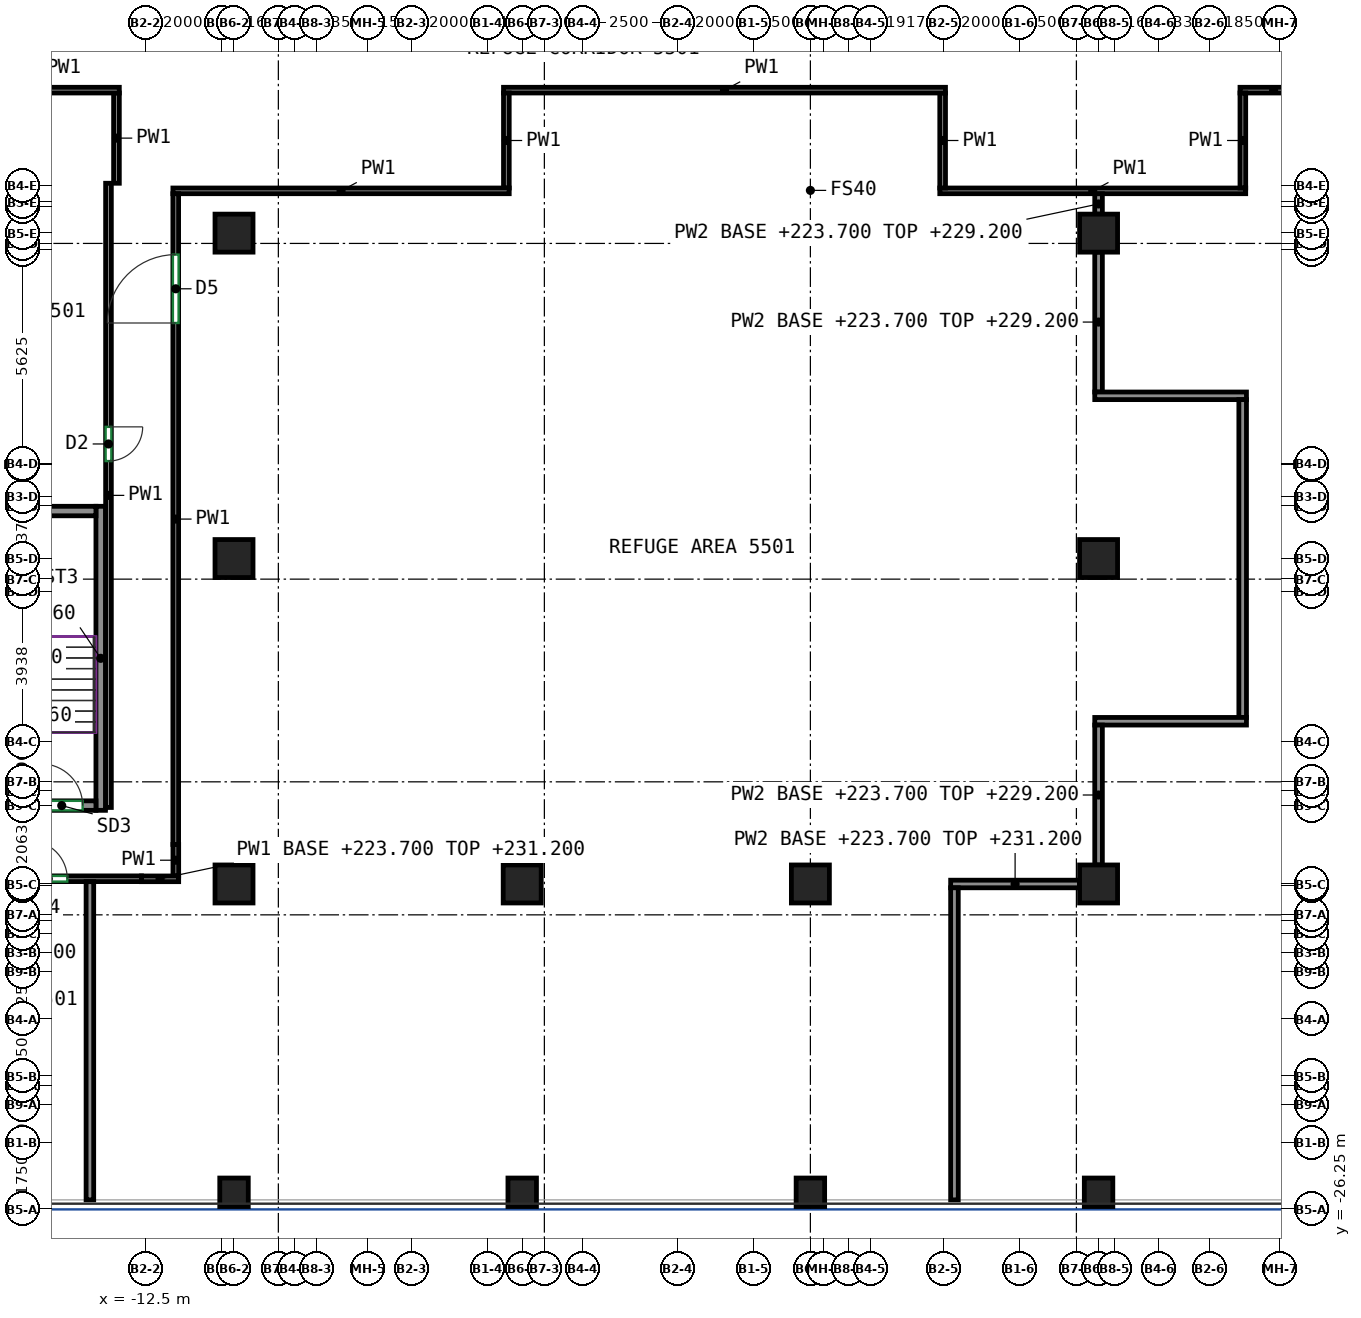
"""IFC4 building model, lengths in metres.
Left out: names, types, materials, properties, quantities, classifications, styles, units other than length and angle.
Written with IfcOpenShell. Run it as: python <this file> out.ifc"""

import sys

from ifc_helpers import new_model, si_unit, direction, frame, frame_2d, origin, origin_2d, place, context, subcontext, project, spatial, rectangle, extrude, source, transform, mapped, element, fill, save


model = new_model("IFC4")
c1 = context("Model", 3, precision=1e-05, world=origin(), true_north=direction((0.0, 1.0)))
c2 = subcontext(c1, "Body", "Model", "MODEL_VIEW")
j1 = project(units=[si_unit("LENGTHUNIT", "METRE"), si_unit("PLANEANGLEUNIT", "RADIAN")], contexts=[c1])
p1 = place(None, origin())
s1 = spatial("IfcSite", under=j1, at=p1, CompositionType="ELEMENT")
p2 = place(p1, origin())
s2 = spatial("IfcBuilding", under=s1, at=p2, CompositionType="ELEMENT")
p3 = place(p2, frame((0.0, 0.0, 223.7)))
s3 = spatial("IfcBuildingStorey", under=s2, at=p3, CompositionType="ELEMENT", Elevation=223.7)
m1 = source(origin(), c2, "Body", "SweptSolid", [
    extrude(rectangle(XDim=0.75, YDim=0.75, at=origin_2d()), origin(), (0.0, 0.0, 1.0), 5.5),
])
p4 = place(p3, frame((-10.167, -25.8, 0.0), z_axis=(0.0, 0.0, 1.0), x_axis=(1.0, 0.0, 0.0)))
e1 = element("IfcColumn", 1, at=p4, inside=s3, PredefinedType="COLUMN", context=c2, shape_type="MappedRepresentation", body=[
    mapped(m1, transform((0.0, 0.0, 0.0))),
])
m2 = source(origin(), c2, "Body", "SweptSolid", [
    extrude(rectangle(XDim=1.0, YDim=1.0, at=origin_2d()), origin(), (0.0, 0.0, 1.0), 5.5),
])
for number, where, z_axis, x_axis in (
    (2, (-10.167, -17.688, 0.0), (0.0, 0.0, 1.0), (1.0, 0.0, 0.0)),
    (3, (-10.167, -9.125, 0.0), (0.0, 0.0, 1.0), (1.0, 0.0, 0.0)),
    (4, (-10.167, -0.562, 0.0), (0.0, 0.0, 1.0), (1.0, 0.0, 0.0)),
):
    element("IfcColumn", number, at=place(p3, frame(where, z_axis=z_axis, x_axis=x_axis)), inside=s3, PredefinedType="COLUMN", context=c2, shape_type="MappedRepresentation", body=[
        mapped(m2, transform((0.0, 0.0, 0.0))),
    ])
p5 = place(p3, frame((-2.583, -25.8, 0.0), z_axis=(0.0, 0.0, 1.0), x_axis=(1.0, 0.0, 0.0)))
e5 = element("IfcColumn", 5, at=p5, inside=s3, PredefinedType="COLUMN", context=c2, shape_type="MappedRepresentation", body=[
    mapped(m1, transform((0.0, 0.0, 0.0))),
])
p6 = place(p3, frame((-2.583, -17.688, 0.0), z_axis=(0.0, 0.0, 1.0), x_axis=(1.0, 0.0, 0.0)))
e6 = element("IfcColumn", 6, at=p6, inside=s3, PredefinedType="COLUMN", context=c2, shape_type="MappedRepresentation", body=[
    mapped(m2, transform((0.0, 0.0, 0.0))),
])
p7 = place(p3, frame((5.0, -25.8, 0.0), z_axis=(0.0, 0.0, 1.0), x_axis=(1.0, 0.0, 0.0)))
e7 = element("IfcColumn", 7, at=p7, inside=s3, PredefinedType="COLUMN", context=c2, shape_type="MappedRepresentation", body=[
    mapped(m1, transform((0.0, 0.0, 0.0))),
])
p8 = place(p3, frame((5.0, -17.688, 0.0), z_axis=(0.0, 0.0, 1.0), x_axis=(1.0, 0.0, 0.0)))
e8 = element("IfcColumn", 8, at=p8, inside=s3, PredefinedType="COLUMN", context=c2, shape_type="MappedRepresentation", body=[
    mapped(m2, transform((0.0, 0.0, 0.0))),
])
p9 = place(p3, frame((12.583, -25.8, 0.0), z_axis=(0.0, 0.0, 1.0), x_axis=(1.0, 0.0, 0.0)))
e9 = element("IfcColumn", 9, at=p9, inside=s3, PredefinedType="COLUMN", context=c2, shape_type="MappedRepresentation", body=[
    mapped(m1, transform((0.0, 0.0, 0.0))),
])
for number, where, z_axis, x_axis in (
    (10, (12.583, -17.688, 0.0), (0.0, 0.0, 1.0), (1.0, 0.0, 0.0)),
    (11, (12.583, -9.125, 0.0), (0.0, 0.0, 1.0), (1.0, 0.0, 0.0)),
    (12, (12.583, -0.562, 0.0), (0.0, 0.0, 1.0), (1.0, 0.0, 0.0)),
):
    element("IfcColumn", number, at=place(p3, frame(where, z_axis=z_axis, x_axis=x_axis)), inside=s3, PredefinedType="COLUMN", context=c2, shape_type="MappedRepresentation", body=[
        mapped(m2, transform((0.0, 0.0, 0.0))),
    ])
m3 = source(origin(), c2, "Body", "SweptSolid", [
    extrude(rectangle(XDim=8.0, YDim=0.25, at=frame_2d((4.0, 0.0))), origin(), (0.0, 0.0, 1.0), 9.5),
])
p10 = place(p3, frame((-13.675, -15.75, 0.0), z_axis=(0.0, 0.0, 1.0), x_axis=(0.0, 1.0, 0.0)))
e13 = element("IfcWall", 13, at=p10, inside=s3, PredefinedType="SHEAR", context=c2, shape_type="MappedRepresentation", body=[
    mapped(m3, transform((0.0, 0.0, 0.0))),
])
m4 = source(origin(), c2, "Body", "SweptSolid", [
    extrude(rectangle(XDim=3.7, YDim=0.25, at=frame_2d((1.85, 0.0))), origin(), (0.0, 0.0, 1.0), 9.5),
])
p11 = place(p3, frame((-17.5, -15.625, 0.0), z_axis=(0.0, 0.0, 1.0), x_axis=(1.0, 0.0, 0.0)))
e14 = element("IfcWall", 14, at=p11, inside=s3, PredefinedType="SHEAR", context=c2, shape_type="MappedRepresentation", body=[
    mapped(m4, transform((0.0, 0.0, 0.0))),
])
p12 = place(p11, frame((0.35, 0.0, 0.0)))
e15 = element("IfcOpeningElement", 15, at=p12, cuts=e14, PredefinedType="OPENING", context=c2, shape_type="SweptSolid", body=[
    extrude(rectangle(XDim=1.1, YDim=2.1, at=frame_2d((0.55, 1.05))), frame((0.0, 0.135, 0.0), z_axis=(0.0, -1.0, 0.0), x_axis=(1.0, 0.0, 0.0)), (0.0, 0.0, 1.0), 0.27),
])
p13 = place(p11, frame((2.25, 0.0, 0.0)))
e16 = element("IfcOpeningElement", 16, at=p13, cuts=e14, PredefinedType="OPENING", context=c2, shape_type="SweptSolid", body=[
    extrude(rectangle(XDim=1.1, YDim=2.1, at=frame_2d((0.55, 1.05))), frame((0.0, 0.135, 0.0), z_axis=(0.0, -1.0, 0.0), x_axis=(1.0, 0.0, 0.0)), (0.0, 0.0, 1.0), 0.27),
])
p14 = place(p3, frame((-17.5, -7.875, 0.0), z_axis=(0.0, 0.0, 1.0), x_axis=(1.0, 0.0, 0.0)))
e17 = element("IfcWall", 17, at=p14, inside=s3, PredefinedType="SHEAR", context=c2, shape_type="MappedRepresentation", body=[
    mapped(m4, transform((0.0, 0.0, 0.0))),
])
p15 = place(p3, frame((-13.47, 0.75, 0.0), z_axis=(0.0, 0.0, 1.0), x_axis=(0.0, -1.0, 0.0)))
e18 = element("IfcWall", 18, at=p15, inside=s3, PredefinedType="PARTITIONING", context=c2, shape_type="SweptSolid", body=[
    extrude(rectangle(XDim=16.425, YDim=0.15, at=frame_2d((8.212, 0.0))), origin(), (0.0, 0.0, 1.0), 9.5),
])
p16 = place(p15, frame((6.41, 0.0, 0.0)))
e19 = element("IfcOpeningElement", 19, at=p16, cuts=e18, PredefinedType="OPENING", context=c2, shape_type="SweptSolid", body=[
    extrude(rectangle(XDim=0.9, YDim=2.1, at=frame_2d((0.45, 1.05))), frame((0.0, 0.085, 0.0), z_axis=(0.0, -1.0, 0.0), x_axis=(1.0, 0.0, 0.0)), (0.0, 0.0, 1.0), 0.17),
])
p17 = place(p3, frame((-13.26, 3.125, 0.0), z_axis=(0.0, 0.0, 1.0), x_axis=(0.0, -1.0, 0.0)))
e20 = element("IfcWall", 20, at=p17, inside=s3, PredefinedType="PARTITIONING", context=c2, shape_type="SweptSolid", body=[
    extrude(rectangle(XDim=2.375, YDim=0.15, at=frame_2d((1.188, 0.0))), origin(), (0.0, 0.0, 1.0), 9.5),
])
p18 = place(p3, frame((-18.075, 3.2, 0.0), z_axis=(0.0, 0.0, 1.0), x_axis=(1.0, 0.0, 0.0)))
e21 = element("IfcWall", 21, at=p18, inside=s3, PredefinedType="PARTITIONING", context=c2, shape_type="SweptSolid", body=[
    extrude(rectangle(XDim=4.89, YDim=0.15, at=frame_2d((2.445, 0.0))), origin(), (0.0, 0.0, 1.0), 9.5),
])
p19 = place(p3, frame((8.405, 0.55, 0.0), z_axis=(0.0, 0.0, 1.0), x_axis=(1.0, 0.0, 0.0)))
e22 = element("IfcWall", 22, at=p19, inside=s3, PredefinedType="PARTITIONING", context=c2, shape_type="SweptSolid", body=[
    extrude(rectangle(XDim=8.05, YDim=0.15, at=frame_2d((4.025, 0.0))), origin(), (0.0, 0.0, 1.0), 9.5),
])
p20 = place(p3, frame((8.48, 3.125, 0.0), z_axis=(0.0, 0.0, 1.0), x_axis=(0.0, -1.0, 0.0)))
e23 = element("IfcWall", 23, at=p20, inside=s3, PredefinedType="PARTITIONING", context=c2, shape_type="SweptSolid", body=[
    extrude(rectangle(XDim=2.5, YDim=0.15, at=frame_2d((1.25, 0.0))), origin(), (0.0, 0.0, 1.0), 9.5),
])
p21 = place(p3, frame((-3.075, 3.2, 0.0), z_axis=(0.0, 0.0, 1.0), x_axis=(1.0, 0.0, 0.0)))
e24 = element("IfcWall", 24, at=p21, inside=s3, PredefinedType="PARTITIONING", context=c2, shape_type="SweptSolid", body=[
    extrude(rectangle(XDim=11.63, YDim=0.15, at=frame_2d((5.815, 0.0))), origin(), (0.0, 0.0, 1.0), 9.5),
])
p22 = place(p3, frame((-3.0, 0.625, 0.0), z_axis=(0.0, 0.0, 1.0), x_axis=(0.0, 1.0, 0.0)))
e25 = element("IfcWall", 25, at=p22, inside=s3, PredefinedType="PARTITIONING", context=c2, shape_type="SweptSolid", body=[
    extrude(rectangle(XDim=2.5, YDim=0.15, at=frame_2d((1.25, 0.0))), origin(), (0.0, 0.0, 1.0), 9.5),
])
p23 = place(p3, frame((-11.775, 0.55, 0.0), z_axis=(0.0, 0.0, 1.0), x_axis=(1.0, 0.0, 0.0)))
e26 = element("IfcWall", 26, at=p23, inside=s3, PredefinedType="PARTITIONING", context=c2, shape_type="SweptSolid", body=[
    extrude(rectangle(XDim=8.85, YDim=0.15, at=frame_2d((4.425, 0.0))), origin(), (0.0, 0.0, 1.0), 9.5),
])
p24 = place(p3, frame((-11.7, -16.648, 0.0), z_axis=(0.0, 0.0, 1.0), x_axis=(0.0, 1.0, 0.0)))
e27 = element("IfcWall", 27, at=p24, inside=s3, PredefinedType="PARTITIONING", context=c2, shape_type="SweptSolid", body=[
    extrude(rectangle(XDim=17.123, YDim=0.15, at=frame_2d((8.562, 0.0))), origin(), (0.0, 0.0, 1.0), 9.5),
])
p25 = place(p24, frame((13.721, 0.0, 0.0)))
e28 = element("IfcOpeningElement", 28, at=p25, cuts=e27, PredefinedType="OPENING", context=c2, shape_type="SweptSolid", body=[
    extrude(rectangle(XDim=1.8, YDim=2.1, at=frame_2d((0.9, 1.05))), frame((0.0, 0.085, 0.0), z_axis=(0.0, -1.0, 0.0), x_axis=(1.0, 0.0, 0.0)), (0.0, 0.0, 1.0), 0.17),
])
p26 = place(p3, frame((-11.698, -17.477, 0.0), z_axis=(0.0, 0.0, 1.0), x_axis=(0.0, 1.0, 0.0)))
e29 = element("IfcWall", 29, at=p26, inside=s3, PredefinedType="PARTITIONING", context=c2, shape_type="SweptSolid", body=[
    extrude(rectangle(XDim=0.829, YDim=0.15, at=frame_2d((0.415, 0.0))), origin(), (0.0, 0.0, 1.0), 9.5),
])
p27 = place(p3, frame((-12.602, -17.552, 0.0), z_axis=(0.0, 0.0, 1.0), x_axis=(1.0, 0.0, 0.0)))
e30 = element("IfcWall", 30, at=p27, inside=s3, PredefinedType="PARTITIONING", context=c2, shape_type="SweptSolid", body=[
    extrude(rectangle(XDim=0.979, YDim=0.15, at=frame_2d((0.49, 0.0))), origin(), (0.0, 0.0, 1.0), 7.5),
])
p28 = place(p3, frame((-17.575, -17.55, 0.0), z_axis=(0.0, 0.0, 1.0), x_axis=(1.0, 0.0, 0.0)))
e31 = element("IfcWall", 31, at=p28, inside=s3, PredefinedType="PARTITIONING", context=c2, shape_type="SweptSolid", body=[
    extrude(rectangle(XDim=4.973, YDim=0.15, at=frame_2d((2.486, 0.0))), origin(), (0.0, 0.0, 1.0), 7.5),
])
p29 = place(p28, frame((2.021, 0.0, 0.0)))
e32 = element("IfcOpeningElement", 32, at=p29, cuts=e31, PredefinedType="OPENING", context=c2, shape_type="SweptSolid", body=[
    extrude(rectangle(XDim=1.0, YDim=2.1, at=frame_2d((0.5, 1.05))), frame((0.0, 0.085, 0.0), z_axis=(0.0, -1.0, 0.0), x_axis=(1.0, 0.0, 0.0)), (0.0, 0.0, 1.0), 0.17),
])
p30 = place(p3, frame((16.305, 3.2, 0.0), z_axis=(0.0, 0.0, 1.0), x_axis=(1.0, 0.0, 0.0)))
e33 = element("IfcWall", 33, at=p30, inside=s3, PredefinedType="PARTITIONING", context=c2, shape_type="SweptSolid", body=[
    extrude(rectangle(XDim=1.77, YDim=0.15, at=frame_2d((0.885, 0.0))), origin(), (0.0, 0.0, 1.0), 9.5),
])
p31 = place(p3, frame((16.38, 0.625, 0.0), z_axis=(0.0, 0.0, 1.0), x_axis=(0.0, 1.0, 0.0)))
e34 = element("IfcWall", 34, at=p31, inside=s3, PredefinedType="PARTITIONING", context=c2, shape_type="SweptSolid", body=[
    extrude(rectangle(XDim=2.5, YDim=0.15, at=frame_2d((1.25, 0.0))), origin(), (0.0, 0.0, 1.0), 9.5),
])
p32 = place(p3, frame((-13.959, -17.627, 0.0), z_axis=(0.0, 0.0, 1.0), x_axis=(0.0, -1.0, 0.0)))
e35 = element("IfcWall", 35, at=p32, inside=s3, PredefinedType="PARTITIONING", context=c2, shape_type="SweptSolid", body=[
    extrude(rectangle(XDim=8.373, YDim=0.2, at=frame_2d((4.187, 0.0))), origin(), (0.0, 0.0, 1.0), 9.5),
])
p33 = place(p3, frame((12.583, -0.062, 0.0), z_axis=(0.0, 0.0, 1.0), x_axis=(0.0, 1.0, 0.0)))
e36 = element("IfcWall", 36, at=p33, inside=s3, PredefinedType="PARTITIONING", context=c2, shape_type="SweptSolid", body=[
    extrude(rectangle(XDim=0.535, YDim=0.2, at=frame_2d((0.268, 0.0))), origin(), (0.0, 0.0, 1.0), 5.5),
])
p34 = place(p3, frame((12.583, -4.743, 0.0), z_axis=(0.0, 0.0, 1.0), x_axis=(0.0, 1.0, 0.0)))
e37 = element("IfcWall", 37, at=p34, inside=s3, PredefinedType="PARTITIONING", context=c2, shape_type="SweptSolid", body=[
    extrude(rectangle(XDim=3.681, YDim=0.2, at=frame_2d((1.84, 0.0))), origin(), (0.0, 0.0, 1.0), 5.5),
])
p35 = place(p3, frame((16.475, -4.843, 0.0), z_axis=(0.0, 0.0, 1.0), x_axis=(-1.0, 0.0, 0.0)))
e38 = element("IfcWall", 38, at=p35, inside=s3, PredefinedType="PARTITIONING", context=c2, shape_type="SweptSolid", body=[
    extrude(rectangle(XDim=3.992, YDim=0.2, at=frame_2d((1.996, 0.0))), origin(), (0.0, 0.0, 1.0), 9.5),
])
p36 = place(p3, frame((16.375, -13.306, 0.0), z_axis=(0.0, 0.0, 1.0), x_axis=(0.0, 1.0, 0.0)))
e39 = element("IfcWall", 39, at=p36, inside=s3, PredefinedType="PARTITIONING", context=c2, shape_type="SweptSolid", body=[
    extrude(rectangle(XDim=8.363, YDim=0.2, at=frame_2d((4.181, 0.0))), origin(), (0.0, 0.0, 1.0), 9.5),
])
p37 = place(p3, frame((12.483, -13.406, 0.0), z_axis=(0.0, 0.0, 1.0), x_axis=(1.0, 0.0, 0.0)))
e40 = element("IfcWall", 40, at=p37, inside=s3, PredefinedType="PARTITIONING", context=c2, shape_type="SweptSolid", body=[
    extrude(rectangle(XDim=3.992, YDim=0.2, at=frame_2d((1.996, 0.0))), origin(), (0.0, 0.0, 1.0), 9.5),
])
p38 = place(p3, frame((12.583, -17.187, 0.0), z_axis=(0.0, 0.0, 1.0), x_axis=(0.0, 1.0, 0.0)))
e41 = element("IfcWall", 41, at=p38, inside=s3, PredefinedType="PARTITIONING", context=c2, shape_type="SweptSolid", body=[
    extrude(rectangle(XDim=3.681, YDim=0.2, at=frame_2d((1.84, 0.0))), origin(), (0.0, 0.0, 1.0), 5.5),
])
p39 = place(p3, frame((8.691, -17.688, 0.0), z_axis=(0.0, 0.0, 1.0), x_axis=(1.0, 0.0, 0.0)))
e42 = element("IfcWall", 42, at=p39, inside=s3, PredefinedType="PARTITIONING", context=c2, shape_type="SweptSolid", body=[
    extrude(rectangle(XDim=3.392, YDim=0.2, at=frame_2d((1.696, 0.0))), origin(), (0.0, 0.0, 1.0), 7.5),
])
p40 = place(p3, frame((8.791, -26.0, 0.0), z_axis=(0.0, 0.0, 1.0), x_axis=(0.0, 1.0, 0.0)))
e43 = element("IfcWall", 43, at=p40, inside=s3, PredefinedType="PARTITIONING", context=c2, shape_type="SweptSolid", body=[
    extrude(rectangle(XDim=8.212, YDim=0.2, at=frame_2d((4.106, 0.0))), origin(), (0.0, 0.0, 1.0), 9.5),
])
p41 = place(p13, origin())
e44 = element("IfcDoor", 44, at=p41, inside=s3, OperationType="SINGLE_SWING_LEFT", PredefinedType="DOOR", context=c2, shape_type="SweptSolid", body=[
    extrude(rectangle(XDim=1.1, YDim=2.1, at=frame_2d((0.55, 1.05))), frame((0.0, 0.025, 0.0), z_axis=(0.0, -1.0, 0.0), x_axis=(1.0, 0.0, 0.0)), (0.0, 0.0, 1.0), 0.05),
])
fill(e16, e44)
p42 = place(p29, origin())
e45 = element("IfcDoor", 45, at=p42, inside=s3, OperationType="SINGLE_SWING_LEFT", PredefinedType="DOOR", context=c2, shape_type="SweptSolid", body=[
    extrude(rectangle(XDim=1.0, YDim=2.1, at=frame_2d((0.5, 1.05))), frame((0.0, 0.025, 0.0), z_axis=(0.0, -1.0, 0.0), x_axis=(1.0, 0.0, 0.0)), (0.0, 0.0, 1.0), 0.05),
])
fill(e32, e45)
p43 = place(p16, origin())
e46 = element("IfcDoor", 46, at=p43, inside=s3, OperationType="SINGLE_SWING_LEFT", PredefinedType="DOOR", context=c2, shape_type="SweptSolid", body=[
    extrude(rectangle(XDim=0.9, YDim=2.1, at=frame_2d((0.45, 1.05))), frame((0.0, 0.025, 0.0), z_axis=(0.0, -1.0, 0.0), x_axis=(1.0, 0.0, 0.0)), (0.0, 0.0, 1.0), 0.05),
])
fill(e19, e46)
p44 = place(p25, origin())
e47 = element("IfcDoor", 47, at=p44, inside=s3, OperationType="DOUBLE_DOOR_SINGLE_SWING", PredefinedType="DOOR", context=c2, shape_type="SweptSolid", body=[
    extrude(rectangle(XDim=1.8, YDim=2.1, at=frame_2d((0.9, 1.05))), frame((0.0, 0.025, 0.0), z_axis=(0.0, -1.0, 0.0), x_axis=(1.0, 0.0, 0.0)), (0.0, 0.0, 1.0), 0.05),
])
fill(e28, e47)
save(model, sys.argv[1])
